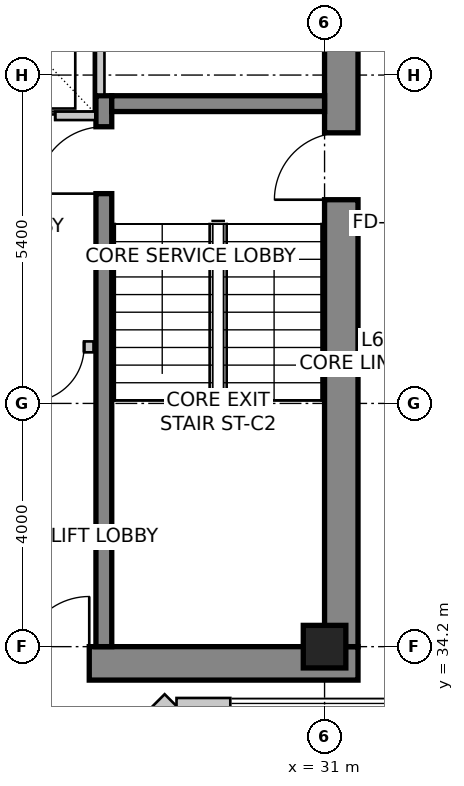
"""IFC4 building model, lengths in metres.
Left out: names, types, materials, properties, quantities, classifications, styles, units other than length and angle.
Written with IfcOpenShell. Run it as: python <this file> out.ifc"""

import sys

from ifc_helpers import new_model, si_unit, direction, frame, frame_2d, origin, origin_2d, place, context, subcontext, project, spatial, rectangle, extrude, source, transform, mapped, element, fill, save


model = new_model("IFC4")
c1 = context("Model", 3, precision=1e-05, world=origin(), true_north=direction((0.0, 1.0)))
c2 = subcontext(c1, "Body", "Model", "MODEL_VIEW")
j1 = project(units=[si_unit("LENGTHUNIT", "METRE"), si_unit("PLANEANGLEUNIT", "RADIAN")], contexts=[c1])
p1 = place(None, origin())
s1 = spatial("IfcSite", under=j1, at=p1, CompositionType="ELEMENT")
p2 = place(p1, origin())
s2 = spatial("IfcBuilding", under=s1, at=p2, CompositionType="ELEMENT")
p3 = place(p2, frame((0.0, 0.0, 252.9)))
s3 = spatial("IfcBuildingStorey", under=s2, at=p3, CompositionType="ELEMENT", Elevation=252.9)
p4 = place(p3, frame((16.05, 33.925, 0.0), z_axis=(0.0, 0.0, 1.0), x_axis=(1.0, 0.0, 0.0)))
e1 = element("IfcWall", 1, at=p4, inside=s3, PredefinedType="SHEAR", context=c2, shape_type="SweptSolid", body=[
    extrude(rectangle(XDim=15.5, YDim=0.55, at=frame_2d((7.75, 0.0))), origin(), (0.0, 0.0, 1.0), 3.6),
])
m1 = source(origin(), c2, "Body", "SweptSolid", [
    extrude(rectangle(XDim=1.1, YDim=2.15, at=frame_2d((0.55, 1.075))), frame((0.0, 0.285, 0.0), z_axis=(0.0, -1.0, 0.0), x_axis=(1.0, 0.0, 0.0)), (0.0, 0.0, 1.0), 0.57),
])
p5 = place(p4, frame((9.98, 0.0, 0.0)))
e2 = element("IfcOpeningElement", 2, at=p5, cuts=e1, PredefinedType="OPENING", context=c2, shape_type="MappedRepresentation", body=[
    mapped(m1, transform((0.0, 0.0, 0.0), scale=1.0)),
])
p6 = place(p3, frame((31.275, 34.2, 0.0), z_axis=(0.0, 0.0, 1.0), x_axis=(0.0, 1.0, 0.0)))
e3 = element("IfcWall", 3, at=p6, inside=s3, PredefinedType="SHEAR", context=c2, shape_type="SweptSolid", body=[
    extrude(rectangle(XDim=11.4, YDim=0.55, at=frame_2d((5.7, 0.0))), origin(), (0.0, 0.0, 1.0), 3.6),
])
p7 = place(p6, frame((7.35, 0.0, 0.0)))
e4 = element("IfcOpeningElement", 4, at=p7, cuts=e3, PredefinedType="OPENING", context=c2, shape_type="MappedRepresentation", body=[
    mapped(m1, transform((0.0, 0.0, 0.0), scale=1.0)),
])
p8 = place(p3, frame((27.37, 34.2, 0.0), z_axis=(0.0, 0.0, 1.0), x_axis=(0.0, 1.0, 0.0)))
e5 = element("IfcWall", 5, at=p8, inside=s3, PredefinedType="SHEAR", context=c2, shape_type="SweptSolid", body=[
    extrude(rectangle(XDim=9.06, YDim=0.26, at=frame_2d((4.53, 0.0))), origin(), (0.0, 0.0, 1.0), 3.6),
])
m2 = source(origin(), c2, "Body", "SweptSolid", [
    extrude(rectangle(XDim=1.1, YDim=2.15, at=frame_2d((0.55, 1.075))), frame((0.0, 0.14, 0.0), z_axis=(0.0, -1.0, 0.0), x_axis=(1.0, 0.0, 0.0)), (0.0, 0.0, 1.0), 0.28),
])
p9 = place(p8, frame((7.45, 0.0, 0.0)))
e6 = element("IfcOpeningElement", 6, at=p9, cuts=e5, PredefinedType="OPENING", context=c2, shape_type="MappedRepresentation", body=[
    mapped(m2, transform((0.0, 0.0, 0.0), scale=1.0)),
])
p10 = place(p3, frame((27.5, 43.13, 0.0), z_axis=(0.0, 0.0, 1.0), x_axis=(1.0, 0.0, 0.0)))
e7 = element("IfcWall", 7, at=p10, inside=s3, PredefinedType="SHEAR", context=c2, shape_type="SweptSolid", body=[
    extrude(rectangle(XDim=3.5, YDim=0.26, at=frame_2d((1.75, 0.0))), origin(), (0.0, 0.0, 1.0), 3.6),
])
m3 = source(origin(), c2, "Body", "SweptSolid", [
    extrude(rectangle(XDim=0.7, YDim=0.7, at=origin_2d()), origin(), (0.0, 0.0, 1.0), 3.6),
])
p11 = place(p3, frame((31.0, 34.2, 0.0), z_axis=(0.0, 0.0, 1.0), x_axis=(1.0, 0.0, 0.0)))
e8 = element("IfcColumn", 8, at=p11, inside=s3, PredefinedType="COLUMN", context=c2, shape_type="MappedRepresentation", body=[
    mapped(m3, transform((0.0, 0.0, 0.0), scale=1.0)),
])
p12 = place(p3, frame((26.42, 31.256, 0.0), z_axis=(0.0, 0.0, 1.0), x_axis=(0.707106781187, 0.707106781187, 0.0)))
e9 = element("IfcWall", 9, at=p12, inside=s3, PredefinedType="SOLIDWALL", context=c2, shape_type="SweptSolid", body=[
    extrude(rectangle(XDim=2.907, YDim=0.3, at=frame_2d((1.454, 0.0))), origin(), (0.0, 0.0, 1.0), 3.35),
])
m4 = source(origin(), c2, "Body", "SweptSolid", [
    extrude(rectangle(XDim=1.8, YDim=2.1, at=frame_2d((0.9, 1.05))), frame((0.0, 0.16, 0.0), z_axis=(0.0, -1.0, 0.0), x_axis=(1.0, 0.0, 0.0)), (0.0, 0.0, 1.0), 0.32),
])
p13 = place(p12, frame((0.554, 0.0, 0.85)))
e10 = element("IfcOpeningElement", 10, at=p13, cuts=e9, PredefinedType="OPENING", context=c2, shape_type="MappedRepresentation", body=[
    mapped(m4, transform((0.0, 0.0, 0.0), scale=1.0)),
])
p14 = place(p3, frame((28.565, 33.206, 0.0), z_axis=(0.0, 0.0, 1.0), x_axis=(1.0, 0.0, 0.0)))
e11 = element("IfcWall", 11, at=p14, inside=s3, PredefinedType="SOLIDWALL", context=c2, shape_type="SweptSolid", body=[
    extrude(rectangle(XDim=0.885, YDim=0.3, at=frame_2d((0.442, 0.0))), origin(), (0.0, 0.0, 1.0), 3.35),
])
p15 = place(p3, frame((20.37, 42.93, 0.0), z_axis=(0.0, 0.0, 1.0), x_axis=(1.0, 0.0, 0.0)))
e12 = element("IfcWall", 12, at=p15, inside=s3, PredefinedType="SOLIDWALL", context=c2, shape_type="SweptSolid", body=[
    extrude(rectangle(XDim=6.86, YDim=0.14, at=frame_2d((3.43, 0.0))), origin(), (0.0, 0.0, 1.0), 3.35),
])
m5 = source(origin(), c2, "Body", "SweptSolid", [
    extrude(rectangle(XDim=1.1, YDim=2.15, at=frame_2d((0.55, 1.075))), frame((0.0, 0.08, 0.0), z_axis=(0.0, -1.0, 0.0), x_axis=(1.0, 0.0, 0.0)), (0.0, 0.0, 1.0), 0.16),
])
p16 = place(p15, frame((0.5, 0.0, 0.0)))
e13 = element("IfcOpeningElement", 13, at=p16, cuts=e12, PredefinedType="OPENING", context=c2, shape_type="MappedRepresentation", body=[
    mapped(m5, transform((0.0, 0.0, 0.0), scale=1.0)),
])
p17 = place(p15, frame((2.7, 0.0, 0.0)))
e14 = element("IfcOpeningElement", 14, at=p17, cuts=e12, PredefinedType="OPENING", context=c2, shape_type="MappedRepresentation", body=[
    mapped(m5, transform((0.0, 0.0, 0.0), scale=1.0)),
])
p18 = place(p15, frame((5.1, 0.0, 0.0)))
e15 = element("IfcOpeningElement", 15, at=p18, cuts=e12, PredefinedType="OPENING", context=c2, shape_type="MappedRepresentation", body=[
    mapped(m5, transform((0.0, 0.0, 0.0), scale=1.0)),
])
p19 = place(p3, frame((27.31, 43.28, 0.0), z_axis=(0.0, 0.0, 1.0), x_axis=(0.0, 1.0, 0.0)))
e16 = element("IfcWall", 16, at=p19, inside=s3, PredefinedType="SOLIDWALL", context=c2, shape_type="SweptSolid", body=[
    extrude(rectangle(XDim=2.3, YDim=0.14, at=frame_2d((1.15, 0.0))), origin(), (0.0, 0.0, 1.0), 3.35),
])
p20 = place(p3, frame((27.2, 39.13, 0.0), z_axis=(0.0, 0.0, 1.0), x_axis=(-1.0, 0.0, 0.0)))
e17 = element("IfcWall", 17, at=p20, inside=s3, PredefinedType="PARTITIONING", context=c2, shape_type="SweptSolid", body=[
    extrude(rectangle(XDim=1.21, YDim=0.18, at=frame_2d((0.605, 0.0))), origin(), (0.0, 0.0, 1.0), 3.35),
])
m6 = source(origin(), c2, "Body", "SweptSolid", [
    extrude(rectangle(XDim=0.9, YDim=2.15, at=frame_2d((0.45, 1.075))), frame((0.0, 0.1, 0.0), z_axis=(0.0, -1.0, 0.0), x_axis=(1.0, 0.0, 0.0)), (0.0, 0.0, 1.0), 0.2),
])
p21 = place(p20, frame((0.155, 0.0, 0.0)))
e18 = element("IfcOpeningElement", 18, at=p21, cuts=e17, PredefinedType="OPENING", context=c2, shape_type="MappedRepresentation", body=[
    mapped(m6, transform((0.0, 0.0, 0.0), scale=1.0)),
])
m7 = source(origin(), c2, "Body", "SweptSolid", [
    extrude(rectangle(XDim=1.1, YDim=2.15, at=frame_2d((0.55, 1.075))), frame((0.0, 0.025, 0.0), z_axis=(0.0, -1.0, 0.0), x_axis=(1.0, 0.0, 0.0)), (0.0, 0.0, 1.0), 0.05),
])
p22 = place(p18, origin())
e19 = element("IfcDoor", 19, at=p22, inside=s3, OperationType="SLIDING_TO_LEFT", PredefinedType="DOOR", context=c2, shape_type="MappedRepresentation", body=[
    mapped(m7, transform((0.0, 0.0, 0.0), scale=1.0)),
])
fill(e15, e19)
m8 = source(origin(), c2, "Body", "SweptSolid", [
    extrude(rectangle(XDim=1.1, YDim=2.15, at=frame_2d((0.55, 1.075))), frame((0.0, 0.025, 0.0), z_axis=(0.0, -1.0, 0.0), x_axis=(1.0, 0.0, 0.0)), (0.0, 0.0, 1.0), 0.05),
])
p23 = place(p9, origin())
e20 = element("IfcDoor", 20, at=p23, inside=s3, OperationType="SINGLE_SWING_LEFT", PredefinedType="DOOR", context=c2, shape_type="MappedRepresentation", body=[
    mapped(m8, transform((0.0, 0.0, 0.0), scale=1.0)),
])
fill(e6, e20)
p24 = place(p7, origin())
e21 = element("IfcDoor", 21, at=p24, inside=s3, OperationType="SINGLE_SWING_LEFT", PredefinedType="DOOR", context=c2, shape_type="MappedRepresentation", body=[
    mapped(m8, transform((0.0, 0.0, 0.0), scale=1.0)),
])
fill(e4, e21)
p25 = place(p5, origin())
e22 = element("IfcDoor", 22, at=p25, inside=s3, OperationType="SINGLE_SWING_RIGHT", PredefinedType="DOOR", context=c2, shape_type="MappedRepresentation", body=[
    mapped(m8, transform((0.0, 0.0, 0.0), scale=1.0)),
])
fill(e2, e22)
m9 = source(origin(), c2, "Body", "SweptSolid", [
    extrude(rectangle(XDim=0.9, YDim=2.15, at=frame_2d((0.45, 1.075))), frame((0.0, 0.025, 0.0), z_axis=(0.0, -1.0, 0.0), x_axis=(1.0, 0.0, 0.0)), (0.0, 0.0, 1.0), 0.05),
])
p26 = place(p21, origin())
e23 = element("IfcDoor", 23, at=p26, inside=s3, OperationType="SINGLE_SWING_RIGHT", PredefinedType="DOOR", context=c2, shape_type="MappedRepresentation", body=[
    mapped(m9, transform((0.0, 0.0, 0.0), scale=1.0)),
])
fill(e18, e23)
save(model, sys.argv[1])
